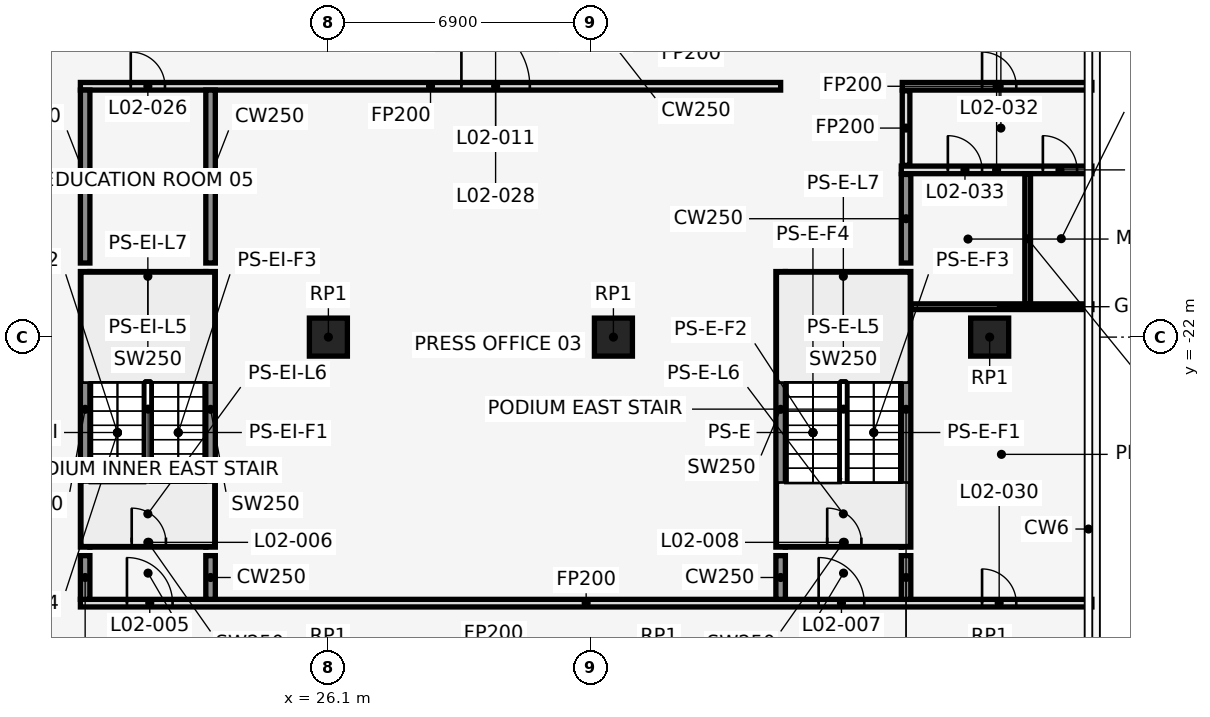
"""IFC4 building model, lengths in metres.
Left out: names, types, materials, properties, quantities, classifications, styles, units other than length and angle.
Written with IfcOpenShell. Run it as: python <this file> out.ifc"""

import sys

from ifc_helpers import new_model, si_unit, direction, frame, frame_2d, origin, origin_2d, place, context, subcontext, project, spatial, rectangle, extrude, element, fill, save


model = new_model("IFC4")
c1 = context("Model", 3, precision=1e-05, world=origin(), true_north=direction((0.0, 1.0)))
c2 = subcontext(c1, "Body", "Model", "MODEL_VIEW")
j1 = project(units=[si_unit("LENGTHUNIT", "METRE"), si_unit("PLANEANGLEUNIT", "RADIAN")], contexts=[c1])
p1 = place(None, origin())
s1 = spatial("IfcSite", under=j1, at=p1, CompositionType="ELEMENT")
p2 = place(p1, origin())
s2 = spatial("IfcBuilding", under=s1, at=p2, CompositionType="ELEMENT")
p3 = place(p2, frame((0.0, 0.0, 14.0)))
s3 = spatial("IfcBuildingStorey", under=s2, at=p3, CompositionType="ELEMENT", Elevation=14.0)
for number, where, z_axis, x_axis in (
    (1, (33.6, -22.0, 0.0), (0.0, 0.0, 1.0), (1.0, 0.0, 0.0)),
    (2, (26.1, -22.0, 0.0), (0.0, 0.0, 1.0), (1.0, 0.0, 0.0)),
    (3, (43.5, -22.0, 0.0), (0.0, 0.0, 1.0), (1.0, 0.0, 0.0)),
):
    element("IfcColumn", number, at=place(p3, frame(where, z_axis=z_axis, x_axis=x_axis)), inside=s3, PredefinedType="COLUMN", context=c2, shape_type="SweptSolid", body=[
        extrude(rectangle(XDim=1.0, YDim=1.0, at=origin_2d()), origin(), (0.0, 0.0, 1.0), 6.0),
    ])
for number, where, z_axis, x_axis in (
    (4, (19.7, -27.525, 0.0), (0.0, 0.0, 1.0), (0.0, 1.0, 0.0)),
    (5, (23.0, -27.525, 0.0), (0.0, 0.0, 1.0), (0.0, 1.0, 0.0)),
):
    element("IfcWall", number, at=place(p3, frame(where, z_axis=z_axis, x_axis=x_axis)), inside=s3, PredefinedType="SHEAR", context=c2, shape_type="SweptSolid", body=[
        extrude(rectangle(XDim=7.25, YDim=0.25, at=frame_2d((3.625, 0.0))), origin(), (0.0, 0.0, 1.0), 6.0),
    ])
p4 = place(p3, frame((19.825, -27.4, 0.0), z_axis=(0.0, 0.0, 1.0), x_axis=(1.0, 0.0, 0.0)))
e6 = element("IfcWall", 6, at=p4, inside=s3, PredefinedType="SHEAR", context=c2, shape_type="SweptSolid", body=[
    extrude(rectangle(XDim=3.05, YDim=0.25, at=frame_2d((1.525, 0.0))), origin(), (0.0, 0.0, 1.0), 6.0),
])
p5 = place(p4, frame((1.1, 0.0, 0.0)))
e7 = element("IfcOpeningElement", 7, at=p5, cuts=e6, PredefinedType="OPENING", context=c2, shape_type="SweptSolid", body=[
    extrude(rectangle(XDim=0.9, YDim=2.1, at=frame_2d((0.45, 1.05))), frame((0.0, 0.137, 0.0), z_axis=(0.0, -1.0, 0.0), x_axis=(1.0, 0.0, 0.0)), (0.0, 0.0, 1.0), 0.274),
])
p6 = place(p3, frame((19.825, -20.4, 0.0), z_axis=(0.0, 0.0, 1.0), x_axis=(1.0, 0.0, 0.0)))
e8 = element("IfcWall", 8, at=p6, inside=s3, PredefinedType="SHEAR", context=c2, shape_type="SweptSolid", body=[
    extrude(rectangle(XDim=3.05, YDim=0.25, at=frame_2d((1.525, 0.0))), origin(), (0.0, 0.0, 1.0), 6.0),
])
for number, where, z_axis, x_axis in (
    (9, (38.0, -27.525, 0.0), (0.0, 0.0, 1.0), (0.0, 1.0, 0.0)),
    (10, (41.3, -27.525, 0.0), (0.0, 0.0, 1.0), (0.0, 1.0, 0.0)),
):
    element("IfcWall", number, at=place(p3, frame(where, z_axis=z_axis, x_axis=x_axis)), inside=s3, PredefinedType="SHEAR", context=c2, shape_type="SweptSolid", body=[
        extrude(rectangle(XDim=7.25, YDim=0.25, at=frame_2d((3.625, 0.0))), origin(), (0.0, 0.0, 1.0), 6.0),
    ])
p7 = place(p3, frame((38.125, -27.4, 0.0), z_axis=(0.0, 0.0, 1.0), x_axis=(1.0, 0.0, 0.0)))
e11 = element("IfcWall", 11, at=p7, inside=s3, PredefinedType="SHEAR", context=c2, shape_type="SweptSolid", body=[
    extrude(rectangle(XDim=3.05, YDim=0.25, at=frame_2d((1.525, 0.0))), origin(), (0.0, 0.0, 1.0), 6.0),
])
p8 = place(p7, frame((1.1, 0.0, 0.0)))
e12 = element("IfcOpeningElement", 12, at=p8, cuts=e11, PredefinedType="OPENING", context=c2, shape_type="SweptSolid", body=[
    extrude(rectangle(XDim=0.9, YDim=2.1, at=frame_2d((0.45, 1.05))), frame((0.0, 0.137, 0.0), z_axis=(0.0, -1.0, 0.0), x_axis=(1.0, 0.0, 0.0)), (0.0, 0.0, 1.0), 0.274),
])
p9 = place(p3, frame((38.125, -20.4, 0.0), z_axis=(0.0, 0.0, 1.0), x_axis=(1.0, 0.0, 0.0)))
e13 = element("IfcWall", 13, at=p9, inside=s3, PredefinedType="SHEAR", context=c2, shape_type="SweptSolid", body=[
    extrude(rectangle(XDim=3.05, YDim=0.25, at=frame_2d((1.525, 0.0))), origin(), (0.0, 0.0, 1.0), 6.0),
])
p10 = place(p3, frame((19.575, -29.0, 0.0), z_axis=(0.0, 0.0, 1.0), x_axis=(1.0, 0.0, 0.0)))
e14 = element("IfcWall", 14, at=p10, inside=s3, PredefinedType="PARTITIONING", context=c2, shape_type="SweptSolid", body=[
    extrude(rectangle(XDim=26.615, YDim=0.2, at=frame_2d((13.308, 0.0))), origin(), (0.0, 0.0, 1.0), 5.7),
])
p11 = place(p10, frame((1.225, 0.0, 0.0)))
e15 = element("IfcOpeningElement", 15, at=p11, cuts=e14, PredefinedType="OPENING", context=c2, shape_type="SweptSolid", body=[
    extrude(rectangle(XDim=1.2, YDim=2.1, at=frame_2d((0.6, 1.05))), frame((0.0, 0.112, 0.0), z_axis=(0.0, -1.0, 0.0), x_axis=(1.0, 0.0, 0.0)), (0.0, 0.0, 1.0), 0.224),
])
p12 = place(p10, frame((19.425, 0.0, 0.0)))
e16 = element("IfcOpeningElement", 16, at=p12, cuts=e14, PredefinedType="OPENING", context=c2, shape_type="SweptSolid", body=[
    extrude(rectangle(XDim=1.2, YDim=2.1, at=frame_2d((0.6, 1.05))), frame((0.0, 0.112, 0.0), z_axis=(0.0, -1.0, 0.0), x_axis=(1.0, 0.0, 0.0)), (0.0, 0.0, 1.0), 0.224),
])
p13 = place(p10, frame((23.725, 0.0, 0.0)))
e17 = element("IfcOpeningElement", 17, at=p13, cuts=e14, PredefinedType="OPENING", context=c2, shape_type="SweptSolid", body=[
    extrude(rectangle(XDim=0.9, YDim=2.1, at=frame_2d((0.45, 1.05))), frame((0.0, 0.112, 0.0), z_axis=(0.0, -1.0, 0.0), x_axis=(1.0, 0.0, 0.0)), (0.0, 0.0, 1.0), 0.224),
])
p14 = place(p3, frame((41.425, -21.2, 0.0), z_axis=(0.0, 0.0, 1.0), x_axis=(1.0, 0.0, 0.0)))
e18 = element("IfcWall", 18, at=p14, inside=s3, PredefinedType="PARTITIONING", context=c2, shape_type="SweptSolid", body=[
    extrude(rectangle(XDim=4.765, YDim=0.15, at=frame_2d((2.382, 0.0))), origin(), (0.0, 0.0, 1.0), 5.7),
])
p15 = place(p3, frame((41.175, -17.6, 0.0), z_axis=(0.0, 0.0, 1.0), x_axis=(1.0, 0.0, 0.0)))
e19 = element("IfcWall", 19, at=p15, inside=s3, PredefinedType="PARTITIONING", context=c2, shape_type="SweptSolid", body=[
    extrude(rectangle(XDim=5.015, YDim=0.2, at=frame_2d((2.507, 0.0))), origin(), (0.0, 0.0, 1.0), 5.7),
])
p16 = place(p15, frame((1.225, 0.0, 0.0)))
e20 = element("IfcOpeningElement", 20, at=p16, cuts=e19, PredefinedType="OPENING", context=c2, shape_type="SweptSolid", body=[
    extrude(rectangle(XDim=0.9, YDim=2.1, at=frame_2d((0.45, 1.05))), frame((0.0, 0.112, 0.0), z_axis=(0.0, -1.0, 0.0), x_axis=(1.0, 0.0, 0.0)), (0.0, 0.0, 1.0), 0.224),
])
p17 = place(p15, frame((3.725, 0.0, 0.0)))
e21 = element("IfcOpeningElement", 21, at=p17, cuts=e19, PredefinedType="OPENING", context=c2, shape_type="SweptSolid", body=[
    extrude(rectangle(XDim=0.9, YDim=2.1, at=frame_2d((0.45, 1.05))), frame((0.0, 0.112, 0.0), z_axis=(0.0, -1.0, 0.0), x_axis=(1.0, 0.0, 0.0)), (0.0, 0.0, 1.0), 0.224),
])
p18 = place(p3, frame((19.575, -15.4, 0.0), z_axis=(0.0, 0.0, 1.0), x_axis=(1.0, 0.0, 0.0)))
e22 = element("IfcWall", 22, at=p18, inside=s3, PredefinedType="PARTITIONING", context=c2, shape_type="SweptSolid", body=[
    extrude(rectangle(XDim=18.425, YDim=0.2, at=frame_2d((9.212, 0.0))), origin(), (0.0, 0.0, 1.0), 5.7),
])
p19 = place(p18, frame((1.325, 0.0, 0.0)))
e23 = element("IfcOpeningElement", 23, at=p19, cuts=e22, PredefinedType="OPENING", context=c2, shape_type="SweptSolid", body=[
    extrude(rectangle(XDim=0.9, YDim=2.1, at=frame_2d((0.45, 1.05))), frame((0.0, 0.112, 0.0), z_axis=(0.0, -1.0, 0.0), x_axis=(1.0, 0.0, 0.0)), (0.0, 0.0, 1.0), 0.224),
])
p20 = place(p18, frame((10.025, 0.0, 0.0)))
e24 = element("IfcOpeningElement", 24, at=p20, cuts=e22, PredefinedType="OPENING", context=c2, shape_type="SweptSolid", body=[
    extrude(rectangle(XDim=1.8, YDim=2.1, at=frame_2d((0.9, 1.05))), frame((0.0, 0.112, 0.0), z_axis=(0.0, -1.0, 0.0), x_axis=(1.0, 0.0, 0.0)), (0.0, 0.0, 1.0), 0.224),
])
p21 = place(p3, frame((41.2, -15.4, 0.0), z_axis=(0.0, 0.0, 1.0), x_axis=(1.0, 0.0, 0.0)))
e25 = element("IfcWall", 25, at=p21, inside=s3, PredefinedType="PARTITIONING", context=c2, shape_type="SweptSolid", body=[
    extrude(rectangle(XDim=4.99, YDim=0.2, at=frame_2d((2.495, 0.0))), origin(), (0.0, 0.0, 1.0), 5.7),
])
p22 = place(p21, frame((2.1, 0.0, 0.0)))
e26 = element("IfcOpeningElement", 26, at=p22, cuts=e25, PredefinedType="OPENING", context=c2, shape_type="SweptSolid", body=[
    extrude(rectangle(XDim=0.9, YDim=2.1, at=frame_2d((0.45, 1.05))), frame((0.0, 0.112, 0.0), z_axis=(0.0, -1.0, 0.0), x_axis=(1.0, 0.0, 0.0)), (0.0, 0.0, 1.0), 0.224),
])
p23 = place(p3, frame((19.7, -28.9, 0.0), z_axis=(0.0, 0.0, 1.0), x_axis=(0.0, 1.0, 0.0)))
e27 = element("IfcWall", 27, at=p23, inside=s3, PredefinedType="SHEAR", context=c2, shape_type="SweptSolid", body=[
    extrude(rectangle(XDim=1.15, YDim=0.25, at=frame_2d((0.575, 0.0))), origin(), (0.0, 0.0, 1.0), 6.0),
])
p24 = place(p3, frame((19.7, -20.05, 0.0), z_axis=(0.0, 0.0, 1.0), x_axis=(0.0, 1.0, 0.0)))
e28 = element("IfcWall", 28, at=p24, inside=s3, PredefinedType="SHEAR", context=c2, shape_type="SweptSolid", body=[
    extrude(rectangle(XDim=4.55, YDim=0.25, at=frame_2d((2.275, 0.0))), origin(), (0.0, 0.0, 1.0), 6.0),
])
p25 = place(p3, frame((23.0, -28.9, 0.0), z_axis=(0.0, 0.0, 1.0), x_axis=(0.0, 1.0, 0.0)))
e29 = element("IfcWall", 29, at=p25, inside=s3, PredefinedType="SHEAR", context=c2, shape_type="SweptSolid", body=[
    extrude(rectangle(XDim=1.15, YDim=0.25, at=frame_2d((0.575, 0.0))), origin(), (0.0, 0.0, 1.0), 6.0),
])
p26 = place(p3, frame((23.0, -20.05, 0.0), z_axis=(0.0, 0.0, 1.0), x_axis=(0.0, 1.0, 0.0)))
e30 = element("IfcWall", 30, at=p26, inside=s3, PredefinedType="SHEAR", context=c2, shape_type="SweptSolid", body=[
    extrude(rectangle(XDim=4.55, YDim=0.25, at=frame_2d((2.275, 0.0))), origin(), (0.0, 0.0, 1.0), 6.0),
])
for number, where, z_axis, x_axis in (
    (31, (38.0, -28.9, 0.0), (0.0, 0.0, 1.0), (0.0, 1.0, 0.0)),
    (32, (41.3, -28.9, 0.0), (0.0, 0.0, 1.0), (0.0, 1.0, 0.0)),
):
    element("IfcWall", number, at=place(p3, frame(where, z_axis=z_axis, x_axis=x_axis)), inside=s3, PredefinedType="SHEAR", context=c2, shape_type="SweptSolid", body=[
        extrude(rectangle(XDim=1.15, YDim=0.25, at=frame_2d((0.575, 0.0))), origin(), (0.0, 0.0, 1.0), 6.0),
    ])
p27 = place(p3, frame((41.3, -20.05, 0.0), z_axis=(0.0, 0.0, 1.0), x_axis=(0.0, 1.0, 0.0)))
e33 = element("IfcWall", 33, at=p27, inside=s3, PredefinedType="SHEAR", context=c2, shape_type="SweptSolid", body=[
    extrude(rectangle(XDim=2.33, YDim=0.25, at=frame_2d((1.165, 0.0))), origin(), (0.0, 0.0, 1.0), 6.0),
])
p28 = place(p3, frame((41.3, -17.48, 0.0), z_axis=(0.0, 0.0, 1.0), x_axis=(0.0, 1.0, 0.0)))
e34 = element("IfcWall", 34, at=p28, inside=s3, PredefinedType="PARTITIONING", context=c2, shape_type="SweptSolid", body=[
    extrude(rectangle(XDim=1.96, YDim=0.2, at=frame_2d((0.98, 0.0))), origin(), (0.0, 0.0, 1.0), 5.7),
])
p29 = place(p3, frame((44.5, -21.125, 0.0), z_axis=(0.0, 0.0, 1.0), x_axis=(0.0, 1.0, 0.0)))
e35 = element("IfcWall", 35, at=p29, inside=s3, PredefinedType="PARTITIONING", context=c2, shape_type="SweptSolid", body=[
    extrude(rectangle(XDim=3.425, YDim=0.15, at=frame_2d((1.712, 0.0))), origin(), (0.0, 0.0, 1.0), 5.7),
])
p30 = place(p11, origin())
e36 = element("IfcDoor", 36, at=p30, inside=s3, OperationType="SINGLE_SWING_LEFT", PredefinedType="DOOR", context=c2, shape_type="SweptSolid", body=[
    extrude(rectangle(XDim=1.2, YDim=2.1, at=frame_2d((0.6, 1.05))), frame((0.0, 0.025, 0.0), z_axis=(0.0, -1.0, 0.0), x_axis=(1.0, 0.0, 0.0)), (0.0, 0.0, 1.0), 0.05),
])
fill(e15, e36)
p31 = place(p5, origin())
e37 = element("IfcDoor", 37, at=p31, inside=s3, OperationType="SINGLE_SWING_RIGHT", PredefinedType="DOOR", context=c2, shape_type="SweptSolid", body=[
    extrude(rectangle(XDim=0.9, YDim=2.1, at=frame_2d((0.45, 1.05))), frame((0.0, 0.025, 0.0), z_axis=(0.0, -1.0, 0.0), x_axis=(1.0, 0.0, 0.0)), (0.0, 0.0, 1.0), 0.05),
])
fill(e7, e37)
p32 = place(p12, origin())
e38 = element("IfcDoor", 38, at=p32, inside=s3, OperationType="SINGLE_SWING_LEFT", PredefinedType="DOOR", context=c2, shape_type="SweptSolid", body=[
    extrude(rectangle(XDim=1.2, YDim=2.1, at=frame_2d((0.6, 1.05))), frame((0.0, 0.025, 0.0), z_axis=(0.0, -1.0, 0.0), x_axis=(1.0, 0.0, 0.0)), (0.0, 0.0, 1.0), 0.05),
])
fill(e16, e38)
p33 = place(p8, origin())
e39 = element("IfcDoor", 39, at=p33, inside=s3, OperationType="SINGLE_SWING_LEFT", PredefinedType="DOOR", context=c2, shape_type="SweptSolid", body=[
    extrude(rectangle(XDim=0.9, YDim=2.1, at=frame_2d((0.45, 1.05))), frame((0.0, 0.025, 0.0), z_axis=(0.0, -1.0, 0.0), x_axis=(1.0, 0.0, 0.0)), (0.0, 0.0, 1.0), 0.05),
])
fill(e12, e39)
p34 = place(p19, frame((0.9, 0.0, 0.0), z_axis=(0.0, 0.0, 1.0), x_axis=(-1.0, 0.0, 0.0)))
e40 = element("IfcDoor", 40, at=p34, inside=s3, OperationType="SINGLE_SWING_RIGHT", PredefinedType="DOOR", context=c2, shape_type="SweptSolid", body=[
    extrude(rectangle(XDim=0.9, YDim=2.1, at=frame_2d((0.45, 1.05))), frame((0.0, 0.025, 0.0), z_axis=(0.0, -1.0, 0.0), x_axis=(1.0, 0.0, 0.0)), (0.0, 0.0, 1.0), 0.05),
])
fill(e23, e40)
p35 = place(p20, origin())
e41 = element("IfcDoor", 41, at=p35, inside=s3, OperationType="SINGLE_SWING_LEFT", PredefinedType="DOOR", context=c2, shape_type="SweptSolid", body=[
    extrude(rectangle(XDim=1.8, YDim=2.1, at=frame_2d((0.9, 1.05))), frame((0.0, 0.025, 0.0), z_axis=(0.0, -1.0, 0.0), x_axis=(1.0, 0.0, 0.0)), (0.0, 0.0, 1.0), 0.05),
])
fill(e24, e41)
p36 = place(p13, origin())
e42 = element("IfcDoor", 42, at=p36, inside=s3, OperationType="SINGLE_SWING_RIGHT", PredefinedType="DOOR", context=c2, shape_type="SweptSolid", body=[
    extrude(rectangle(XDim=0.9, YDim=2.1, at=frame_2d((0.45, 1.05))), frame((0.0, 0.025, 0.0), z_axis=(0.0, -1.0, 0.0), x_axis=(1.0, 0.0, 0.0)), (0.0, 0.0, 1.0), 0.05),
])
fill(e17, e42)
p37 = place(p22, frame((0.9, 0.0, 0.0), z_axis=(0.0, 0.0, 1.0), x_axis=(-1.0, 0.0, 0.0)))
e43 = element("IfcDoor", 43, at=p37, inside=s3, OperationType="SINGLE_SWING_RIGHT", PredefinedType="DOOR", context=c2, shape_type="SweptSolid", body=[
    extrude(rectangle(XDim=0.9, YDim=2.1, at=frame_2d((0.45, 1.05))), frame((0.0, 0.025, 0.0), z_axis=(0.0, -1.0, 0.0), x_axis=(1.0, 0.0, 0.0)), (0.0, 0.0, 1.0), 0.05),
])
fill(e26, e43)
p38 = place(p16, frame((0.9, 0.0, 0.0), z_axis=(0.0, 0.0, 1.0), x_axis=(-1.0, 0.0, 0.0)))
e44 = element("IfcDoor", 44, at=p38, inside=s3, OperationType="SINGLE_SWING_RIGHT", PredefinedType="DOOR", context=c2, shape_type="SweptSolid", body=[
    extrude(rectangle(XDim=0.9, YDim=2.1, at=frame_2d((0.45, 1.05))), frame((0.0, 0.025, 0.0), z_axis=(0.0, -1.0, 0.0), x_axis=(1.0, 0.0, 0.0)), (0.0, 0.0, 1.0), 0.05),
])
fill(e20, e44)
p39 = place(p17, frame((0.9, 0.0, 0.0), z_axis=(0.0, 0.0, 1.0), x_axis=(-1.0, 0.0, 0.0)))
e45 = element("IfcDoor", 45, at=p39, inside=s3, OperationType="SINGLE_SWING_LEFT", PredefinedType="DOOR", context=c2, shape_type="SweptSolid", body=[
    extrude(rectangle(XDim=0.9, YDim=2.1, at=frame_2d((0.45, 1.05))), frame((0.0, 0.025, 0.0), z_axis=(0.0, -1.0, 0.0), x_axis=(1.0, 0.0, 0.0)), (0.0, 0.0, 1.0), 0.05),
])
fill(e21, e45)
save(model, sys.argv[1])
